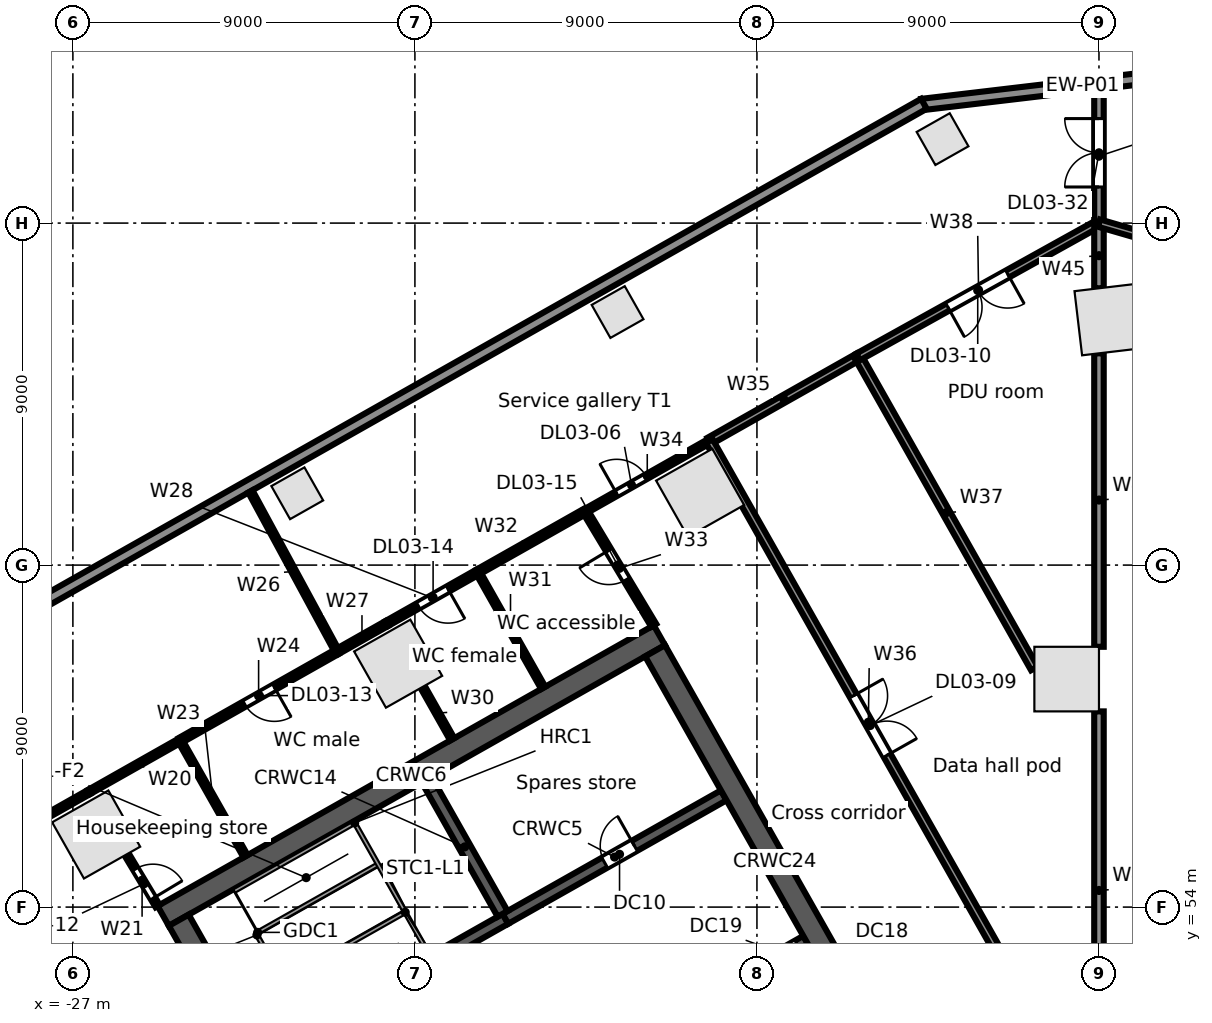
"""IFC4 building model, lengths in metres.
Left out: names, types, materials, properties, quantities, classifications, styles, units other than length and angle.
Written with IfcOpenShell. Run it as: python <this file> out.ifc"""

import sys

from ifc_helpers import new_model, si_unit, direction, frame, frame_2d, origin, origin_2d, place, context, subcontext, project, spatial, rectangle, extrude, element, fill, save


model = new_model("IFC4")
c1 = context("Model", 3, precision=1e-05, world=origin(), true_north=direction((0.0, 1.0)))
c2 = subcontext(c1, "Body", "Model", "MODEL_VIEW")
j1 = project(units=[si_unit("LENGTHUNIT", "METRE"), si_unit("PLANEANGLEUNIT", "RADIAN")], contexts=[c1])
p1 = place(None, origin())
s1 = spatial("IfcSite", under=j1, at=p1, CompositionType="ELEMENT")
p2 = place(p1, origin())
s2 = spatial("IfcBuilding", under=s1, at=p2, CompositionType="ELEMENT")
p3 = place(p2, frame((0.0, 0.0, 16.5)))
s3 = spatial("IfcBuildingStorey", under=s2, at=p3, CompositionType="ELEMENT", Elevation=16.5)
for number, where, z_axis, x_axis in (
    (1, (0.3, 69.464, 0.0), (0.0, 0.0, 1.0), (-0.993, -0.118, 0.0)),
    (2, (-10.495, 64.902, 0.0), (0.0, 0.0, 1.0), (-0.87, -0.492, 0.0)),
    (3, (-18.441, 60.406, 0.0), (0.0, 0.0, 1.0), (-0.87, -0.492, 0.0)),
    (4, (-26.388, 55.91, 0.0), (0.0, 0.0, 1.0), (-0.87, -0.492, 0.0)),
    (5, (-0.85, 60.0, 0.0), (0.0, 0.0, 1.0), (0.0, 1.0, 0.0)),
):
    element("IfcColumn", number, at=place(p3, frame(where, z_axis=z_axis, x_axis=x_axis)), inside=s3, PredefinedType="COLUMN", context=c2, shape_type="SweptSolid", body=[
        extrude(rectangle(XDim=1.7, YDim=1.7, at=origin_2d()), origin(), (0.0, 0.0, 1.0), 5.0),
    ])
for number, where, z_axis, x_axis in (
    (6, (-4.116, 74.21, 0.0), (0.0, 0.0, 1.0), (-0.87, -0.492, 0.0)),
    (7, (-12.667, 69.659, 0.0), (0.0, 0.0, 1.0), (-0.87, -0.492, 0.0)),
    (8, (-21.096, 64.89, 0.0), (0.0, 0.0, 1.0), (-0.87, -0.492, 0.0)),
):
    element("IfcColumn", number, at=place(p3, frame(where, z_axis=z_axis, x_axis=x_axis)), inside=s3, PredefinedType="COLUMN", context=c2, shape_type="SweptSolid", body=[
        extrude(rectangle(XDim=1.0, YDim=1.0, at=origin_2d()), origin(), (0.0, 0.0, 1.0), 5.0),
    ])
p4 = place(p3, frame((-4.663, 75.12, 0.0), z_axis=(0.0, 0.0, 1.0), x_axis=(0.993070050845, 0.117523929966, 0.0)))
e9 = element("IfcWall", 9, at=p4, inside=s3, PredefinedType="STANDARD", context=c2, shape_type="SweptSolid", body=[
    extrude(rectangle(XDim=8.528, YDim=0.3, at=frame_2d((4.264, 0.0))), origin(), (0.0, 0.0, 1.0), 4.65),
])
p5 = place(p3, frame((-63.707, 41.701, 0.0), z_axis=(0.0, 0.0, 1.0), x_axis=(0.870355510268, 0.492423888277, 0.0)))
e10 = element("IfcWall", 10, at=p5, inside=s3, PredefinedType="STANDARD", context=c2, shape_type="SweptSolid", body=[
    extrude(rectangle(XDim=67.903, YDim=0.3, at=frame_2d((33.952, 0.0))), origin(), (0.0, 0.0, 1.0), 4.65),
])
p6 = place(p3, frame((-13.365, 49.911, 0.0), z_axis=(0.0, 0.0, 1.0), x_axis=(0.870340995471, 0.49244954219, 0.0)))
e11 = element("IfcWall", 11, at=p6, inside=s3, PredefinedType="SOLIDWALL", context=c2, shape_type="SweptSolid", body=[
    extrude(rectangle(XDim=6.5, YDim=0.3, at=frame_2d((3.25, 0.0))), origin(), (0.0, 0.0, 1.0), 4.65),
])
p7 = place(p6, frame((1.95, 0.0, 0.0)))
e12 = element("IfcOpeningElement", 12, at=p7, cuts=e11, PredefinedType="OPENING", context=c2, shape_type="SweptSolid", body=[
    extrude(rectangle(XDim=0.9, YDim=2.1, at=frame_2d((0.45, 1.05))), frame((0.0, 0.16, 0.0), z_axis=(0.0, -1.0, 0.0), x_axis=(1.0, 0.0, 0.0)), (0.0, 0.0, 1.0), 0.32),
])
p8 = place(p6, frame((5.35, 0.0, 0.0)))
e13 = element("IfcOpeningElement", 13, at=p8, cuts=e11, PredefinedType="OPENING", context=c2, shape_type="SweptSolid", body=[
    extrude(rectangle(XDim=0.9, YDim=2.1, at=frame_2d((0.45, 1.05))), frame((0.0, 0.16, 0.0), z_axis=(0.0, -1.0, 0.0), x_axis=(1.0, 0.0, 0.0)), (0.0, 0.0, 1.0), 0.32),
])
p9 = place(p3, frame((-21.885, 50.146, 0.0), z_axis=(0.0, 0.0, 1.0), x_axis=(0.870359411463, 0.492416992881, 0.0)))
e14 = element("IfcWall", 14, at=p9, inside=s3, PredefinedType="SOLIDWALL", context=c2, shape_type="SweptSolid", body=[
    extrude(rectangle(XDim=7.2, YDim=0.3, at=frame_2d((3.6, 0.0))), origin(), (0.0, 0.0, 1.0), 4.65),
])
p10 = place(p9, frame((0.2, 0.0, 0.0)))
e15 = element("IfcOpeningElement", 15, at=p10, cuts=e14, PredefinedType="OPENING", context=c2, shape_type="SweptSolid", body=[
    extrude(rectangle(XDim=1.0, YDim=2.1, at=frame_2d((0.5, 1.05))), frame((0.0, 0.16, 0.0), z_axis=(0.0, -1.0, 0.0), x_axis=(1.0, 0.0, 0.0)), (0.0, 0.0, 1.0), 0.32),
])
p11 = place(p3, frame((-15.618, 53.691, 0.0), z_axis=(0.0, 0.0, 1.0), x_axis=(0.870356769198, 0.492421663121, 0.0)))
e16 = element("IfcWall", 16, at=p11, inside=s3, PredefinedType="SOLIDWALL", context=c2, shape_type="SweptSolid", body=[
    extrude(rectangle(XDim=6.6, YDim=0.3, at=frame_2d((3.3, 0.0))), origin(), (0.0, 0.0, 1.0), 4.65),
])
p12 = place(p11, frame((3.0, 0.0, 0.0)))
e17 = element("IfcOpeningElement", 17, at=p12, cuts=e16, PredefinedType="OPENING", context=c2, shape_type="SweptSolid", body=[
    extrude(rectangle(XDim=0.9, YDim=2.1, at=frame_2d((0.45, 1.05))), frame((0.0, 0.16, 0.0), z_axis=(0.0, -1.0, 0.0), x_axis=(1.0, 0.0, 0.0)), (0.0, 0.0, 1.0), 0.32),
])
p13 = place(p3, frame((-24.623, 53.767, 0.0), z_axis=(0.0, 0.0, 1.0), x_axis=(0.870356627484, 0.492421913601, 0.0)))
e18 = element("IfcWall", 18, at=p13, inside=s3, PredefinedType="SOLIDWALL", context=c2, shape_type="SweptSolid", body=[
    extrude(rectangle(XDim=15.0, YDim=0.6, at=frame_2d((7.5, 0.0))), origin(), (0.0, 0.0, 1.0), 4.65),
])
p14 = place(p3, frame((-24.214, 53.654, 0.0), z_axis=(0.0, 0.0, 1.0), x_axis=(0.492441221355, -0.870345703448, 0.0)))
e19 = element("IfcWall", 19, at=p14, inside=s3, PredefinedType="SOLIDWALL", context=c2, shape_type="SweptSolid", body=[
    extrude(rectangle(XDim=12.8, YDim=0.6, at=frame_2d((6.4, 0.0))), origin(), (0.0, 0.0, 1.0), 4.65),
])
p15 = place(p3, frame((-17.686, 57.347, 0.0), z_axis=(0.0, 0.0, 1.0), x_axis=(0.492420746998, -0.870357287513, 0.0)))
e20 = element("IfcWall", 20, at=p15, inside=s3, PredefinedType="SOLIDWALL", context=c2, shape_type="SweptSolid", body=[
    extrude(rectangle(XDim=4.05, YDim=0.3, at=frame_2d((2.025, 0.0))), origin(), (0.0, 0.0, 1.0), 4.65),
])
p16 = place(p3, frame((-11.681, 60.744, 0.0), z_axis=(0.0, 0.0, 1.0), x_axis=(0.492426772896, -0.870353878221, 0.0)))
e21 = element("IfcWall", 21, at=p16, inside=s3, PredefinedType="SOLIDWALL", context=c2, shape_type="SweptSolid", body=[
    extrude(rectangle(XDim=12.8, YDim=0.6, at=frame_2d((6.4, 0.0))), origin(), (0.0, 0.0, 1.0), 4.65),
])
p17 = place(p3, frame((-33.536, 53.09, 0.0), z_axis=(0.0, 0.0, 1.0), x_axis=(0.870327439455, 0.492473499928, 0.0)))
e22 = element("IfcWall", 22, at=p17, inside=s3, PredefinedType="PARTITIONING", context=c2, shape_type="SweptSolid", body=[
    extrude(rectangle(XDim=8.0, YDim=0.125, at=frame_2d((4.0, 0.0))), origin(), (0.0, 0.0, 1.0), 3.712),
])
p18 = place(p17, frame((3.45, 0.0, 0.0)))
e23 = element("IfcOpeningElement", 23, at=p18, cuts=e22, PredefinedType="OPENING", context=c2, shape_type="SweptSolid", body=[
    extrude(rectangle(XDim=0.9, YDim=2.1, at=frame_2d((0.45, 1.05))), frame((0.0, 0.073, 0.0), z_axis=(0.0, -1.0, 0.0), x_axis=(1.0, 0.0, 0.0)), (0.0, 0.0, 1.0), 0.145),
])
p19 = place(p3, frame((-26.573, 57.03, 0.0), z_axis=(0.0, 0.0, 1.0), x_axis=(0.870344460795, 0.492443417626, 0.0)))
e24 = element("IfcWall", 24, at=p19, inside=s3, PredefinedType="PARTITIONING", context=c2, shape_type="SweptSolid", body=[
    extrude(rectangle(XDim=2.75, YDim=0.125, at=frame_2d((1.375, 0.0))), origin(), (0.0, 0.0, 1.0), 4.65),
])
p20 = place(p3, frame((-25.587, 55.387, 0.0), z_axis=(0.0, 0.0, 1.0), x_axis=(0.514767546849, -0.857329792268, 0.0)))
e25 = element("IfcWall", 25, at=p20, inside=s3, PredefinedType="PARTITIONING", context=c2, shape_type="SweptSolid", body=[
    extrude(rectangle(XDim=1.585, YDim=0.125, at=frame_2d((0.792, 0.0))), origin(), (0.0, 0.0, 1.0), 4.65),
])
p21 = place(p20, frame((0.45, 0.0, 0.0)))
e26 = element("IfcOpeningElement", 26, at=p21, cuts=e25, PredefinedType="OPENING", context=c2, shape_type="SweptSolid", body=[
    extrude(rectangle(XDim=0.9, YDim=2.1, at=frame_2d((0.45, 1.05))), frame((0.0, 0.073, 0.0), z_axis=(0.0, -1.0, 0.0), x_axis=(1.0, 0.0, 0.0)), (0.0, 0.0, 1.0), 0.145),
])
p22 = place(p3, frame((-24.18, 58.384, 0.0), z_axis=(0.0, 0.0, 1.0), x_axis=(0.492521469645, -0.870300294116, 0.0)))
e27 = element("IfcWall", 27, at=p22, inside=s3, PredefinedType="PARTITIONING", context=c2, shape_type="SweptSolid", body=[
    extrude(rectangle(XDim=3.5, YDim=0.125, at=frame_2d((1.75, 0.0))), origin(), (0.0, 0.0, 1.0), 3.93),
])
p23 = place(p3, frame((-24.18, 58.384, 0.0), z_axis=(0.0, 0.0, 1.0), x_axis=(0.870360772617, 0.492414587, 0.0)))
e28 = element("IfcWall", 28, at=p23, inside=s3, PredefinedType="PARTITIONING", context=c2, shape_type="SweptSolid", body=[
    extrude(rectangle(XDim=4.75, YDim=0.15, at=frame_2d((2.375, 0.0))), origin(), (0.0, 0.0, 1.0), 4.65),
])
p24 = place(p23, frame((1.95, 0.0, 0.0)))
e29 = element("IfcOpeningElement", 29, at=p24, cuts=e28, PredefinedType="OPENING", context=c2, shape_type="SweptSolid", body=[
    extrude(rectangle(XDim=0.9, YDim=2.1, at=frame_2d((0.45, 1.05))), frame((0.0, 0.085, 0.0), z_axis=(0.0, -1.0, 0.0), x_axis=(1.0, 0.0, 0.0)), (0.0, 0.0, 1.0), 0.17),
])
p25 = place(p3, frame((-22.33, 64.939, 0.0), z_axis=(0.0, 0.0, 1.0), x_axis=(0.476360236723, -0.879250206067, 0.0)))
e30 = element("IfcWall", 30, at=p25, inside=s3, PredefinedType="PARTITIONING", context=c2, shape_type="SweptSolid", body=[
    extrude(rectangle(XDim=4.795, YDim=0.125, at=frame_2d((2.397, 0.0))), origin(), (0.0, 0.0, 1.0), 3.93),
])
p26 = place(p3, frame((-20.046, 60.723, 0.0), z_axis=(0.0, 0.0, 1.0), x_axis=(0.870308175411, 0.492507542899, 0.0)))
e31 = element("IfcWall", 31, at=p26, inside=s3, PredefinedType="PARTITIONING", context=c2, shape_type="SweptSolid", body=[
    extrude(rectangle(XDim=1.5, YDim=0.15, at=frame_2d((0.75, 0.0))), origin(), (0.0, 0.0, 1.0), 3.93),
])
p27 = place(p3, frame((-18.74, 61.462, 0.0), z_axis=(0.0, 0.0, 1.0), x_axis=(0.870430549821, 0.492291232848, 0.0)))
e32 = element("IfcWall", 32, at=p27, inside=s3, PredefinedType="PARTITIONING", context=c2, shape_type="SweptSolid", body=[
    extrude(rectangle(XDim=2.75, YDim=0.15, at=frame_2d((1.375, 0.0))), origin(), (0.0, 0.0, 1.0), 4.65),
])
p28 = place(p27, frame((0.95, 0.0, 0.0)))
e33 = element("IfcOpeningElement", 33, at=p28, cuts=e32, PredefinedType="OPENING", context=c2, shape_type="SweptSolid", body=[
    extrude(rectangle(XDim=0.9, YDim=2.1, at=frame_2d((0.45, 1.05))), frame((0.0, 0.085, 0.0), z_axis=(0.0, -1.0, 0.0), x_axis=(1.0, 0.0, 0.0)), (0.0, 0.0, 1.0), 0.17),
])
p29 = place(p3, frame((-17.797, 59.794, 0.0), z_axis=(0.0, 0.0, 1.0), x_axis=(0.492366981934, -0.870387703901, 0.0)))
e34 = element("IfcWall", 34, at=p29, inside=s3, PredefinedType="PARTITIONING", context=c2, shape_type="SweptSolid", body=[
    extrude(rectangle(XDim=1.584, YDim=0.125, at=frame_2d((0.792, 0.0))), origin(), (0.0, 0.0, 1.0), 4.65),
])
p30 = place(p3, frame((-16.346, 62.816, 0.0), z_axis=(0.0, 0.0, 1.0), x_axis=(0.492220429283, -0.870470590541, 0.0)))
e35 = element("IfcWall", 35, at=p30, inside=s3, PredefinedType="PARTITIONING", context=c2, shape_type="SweptSolid", body=[
    extrude(rectangle(XDim=3.5, YDim=0.125, at=frame_2d((1.75, 0.0))), origin(), (0.0, 0.0, 1.0), 3.93),
])
p31 = place(p3, frame((-16.346, 62.816, 0.0), z_axis=(0.0, 0.0, 1.0), x_axis=(0.870334637055, 0.492460779699, 0.0)))
e36 = element("IfcWall", 36, at=p31, inside=s3, PredefinedType="PARTITIONING", context=c2, shape_type="SweptSolid", body=[
    extrude(rectangle(XDim=3.249, YDim=0.15, at=frame_2d((1.625, 0.0))), origin(), (0.0, 0.0, 1.0), 4.65),
])
p32 = place(p3, frame((-13.518, 64.416, 0.0), z_axis=(0.0, 0.0, 1.0), x_axis=(0.514875058642, -0.857265229663, 0.0)))
e37 = element("IfcWall", 37, at=p32, inside=s3, PredefinedType="PARTITIONING", context=c2, shape_type="SweptSolid", body=[
    extrude(rectangle(XDim=3.502, YDim=0.15, at=frame_2d((1.751, 0.0))), origin(), (0.0, 0.0, 1.0), 3.93),
])
p33 = place(p32, frame((1.2, 0.0, 0.0)))
e38 = element("IfcOpeningElement", 38, at=p33, cuts=e37, PredefinedType="OPENING", context=c2, shape_type="SweptSolid", body=[
    extrude(rectangle(XDim=0.9, YDim=2.1, at=frame_2d((0.45, 1.05))), frame((0.0, 0.085, 0.0), z_axis=(0.0, -1.0, 0.0), x_axis=(1.0, 0.0, 0.0)), (0.0, 0.0, 1.0), 0.17),
])
p34 = place(p3, frame((-13.518, 64.416, 0.0), z_axis=(0.0, 0.0, 1.0), x_axis=(0.870338454914, 0.492454032268, 0.0)))
e39 = element("IfcWall", 39, at=p34, inside=s3, PredefinedType="PARTITIONING", context=c2, shape_type="SweptSolid", body=[
    extrude(rectangle(XDim=3.75, YDim=0.125, at=frame_2d((1.875, 0.0))), origin(), (0.0, 0.0, 1.0), 3.712),
])
p35 = place(p34, frame((0.95, 0.0, 0.0)))
e40 = element("IfcOpeningElement", 40, at=p35, cuts=e39, PredefinedType="OPENING", context=c2, shape_type="SweptSolid", body=[
    extrude(rectangle(XDim=0.9, YDim=2.1, at=frame_2d((0.45, 1.05))), frame((0.0, 0.073, 0.0), z_axis=(0.0, -1.0, 0.0), x_axis=(1.0, 0.0, 0.0)), (0.0, 0.0, 1.0), 0.145),
])
p36 = place(p3, frame((-10.254, 66.263, 0.0), z_axis=(0.0, 0.0, 1.0), x_axis=(0.870454697906, 0.492248533664, 0.0)))
e41 = element("IfcWall", 41, at=p36, inside=s3, PredefinedType="PARTITIONING", context=c2, shape_type="SweptSolid", body=[
    extrude(rectangle(XDim=4.5, YDim=0.2, at=frame_2d((2.25, 0.0))), origin(), (0.0, 0.0, 1.0), 4.65),
])
p37 = place(p3, frame((-10.254, 66.263, 0.0), z_axis=(0.0, 0.0, 1.0), x_axis=(0.492411664329, -0.870362426138, 0.0)))
e42 = element("IfcWall", 42, at=p37, inside=s3, PredefinedType="PARTITIONING", context=c2, shape_type="SweptSolid", body=[
    extrude(rectangle(XDim=17.0, YDim=0.2, at=frame_2d((8.5, 0.0))), origin(), (0.0, 0.0, 1.0), 3.712),
])
p38 = place(p37, frame((7.7, 0.0, 0.0)))
e43 = element("IfcOpeningElement", 43, at=p38, cuts=e42, PredefinedType="OPENING", context=c2, shape_type="SweptSolid", body=[
    extrude(rectangle(XDim=1.8, YDim=2.1, at=frame_2d((0.9, 1.05))), frame((0.0, 0.11, 0.0), z_axis=(0.0, -1.0, 0.0), x_axis=(1.0, 0.0, 0.0)), (0.0, 0.0, 1.0), 0.22),
])
p39 = place(p3, frame((-6.337, 68.478, 0.0), z_axis=(0.0, 0.0, 1.0), x_axis=(0.492412602502, -0.870361895361, 0.0)))
e44 = element("IfcWall", 44, at=p39, inside=s3, PredefinedType="PARTITIONING", context=c2, shape_type="SweptSolid", body=[
    extrude(rectangle(XDim=9.417, YDim=0.2, at=frame_2d((4.708, 0.0))), origin(), (0.0, 0.0, 1.0), 3.712),
])
p40 = place(p3, frame((-6.337, 68.478, 0.0), z_axis=(0.0, 0.0, 1.0), x_axis=(0.87407148623, 0.485797320864, 0.0)))
e45 = element("IfcWall", 45, at=p40, inside=s3, PredefinedType="PARTITIONING", context=c2, shape_type="SweptSolid", body=[
    extrude(rectangle(XDim=7.25, YDim=0.2, at=frame_2d((3.625, 0.0))), origin(), (0.0, 0.0, 1.0), 3.93),
])
p41 = place(p40, frame((2.7, 0.0, 0.0)))
e46 = element("IfcOpeningElement", 46, at=p41, cuts=e45, PredefinedType="OPENING", context=c2, shape_type="SweptSolid", body=[
    extrude(rectangle(XDim=1.8, YDim=2.1, at=frame_2d((0.9, 1.05))), frame((0.0, 0.11, 0.0), z_axis=(0.0, -1.0, 0.0), x_axis=(1.0, 0.0, 0.0)), (0.0, 0.0, 1.0), 0.22),
])
p42 = place(p3, frame((0.0, 49.726, 0.0), z_axis=(0.0, 0.0, 1.0), x_axis=(0.0, 1.0, 0.0)))
e47 = element("IfcWall", 47, at=p42, inside=s3, PredefinedType="PARTITIONING", context=c2, shape_type="SweptSolid", body=[
    extrude(rectangle(XDim=9.424, YDim=0.25, at=frame_2d((4.712, 0.0))), origin(), (0.0, 0.0, 1.0), 4.65),
])
p43 = place(p3, frame((0.0, 60.85, 0.0), z_axis=(0.0, 0.0, 1.0), x_axis=(0.0, 1.0, 0.0)))
e48 = element("IfcWall", 48, at=p43, inside=s3, PredefinedType="PARTITIONING", context=c2, shape_type="SweptSolid", body=[
    extrude(rectangle(XDim=7.723, YDim=0.25, at=frame_2d((3.861, 0.0))), origin(), (0.0, 0.0, 1.0), 3.93),
])
p44 = place(p3, frame((0.0, 70.285, 0.0), z_axis=(0.0, 0.0, 1.0), x_axis=(0.0, 1.0, 0.0)))
e49 = element("IfcWall", 49, at=p44, inside=s3, PredefinedType="PARTITIONING", context=c2, shape_type="SweptSolid", body=[
    extrude(rectangle(XDim=1.715, YDim=0.25, at=frame_2d((0.857, 0.0))), origin(), (0.0, 0.0, 1.0), 4.65),
])
p45 = place(p3, frame((0.0, 72.0, 0.0), z_axis=(0.0, 0.0, 1.0), x_axis=(0.0, 1.0, 0.0)))
e50 = element("IfcWall", 50, at=p45, inside=s3, PredefinedType="PARTITIONING", context=c2, shape_type="SweptSolid", body=[
    extrude(rectangle(XDim=3.521, YDim=0.25, at=frame_2d((1.76, 0.0))), origin(), (0.0, 0.0, 1.0), 4.024),
])
p46 = place(p45, frame((0.95, 0.0, 0.0)))
e51 = element("IfcOpeningElement", 51, at=p46, cuts=e50, PredefinedType="OPENING", context=c2, shape_type="SweptSolid", body=[
    extrude(rectangle(XDim=1.8, YDim=2.1, at=frame_2d((0.9, 1.05))), frame((0.0, 0.135, 0.0), z_axis=(0.0, -1.0, 0.0), x_axis=(1.0, 0.0, 0.0)), (0.0, 0.0, 1.0), 0.27),
])
p47 = place(p3, frame((0.0, 72.0, 0.0), z_axis=(0.0, 0.0, 1.0), x_axis=(0.960375968852, -0.278707729443, 0.0)))
e52 = element("IfcWall", 52, at=p47, inside=s3, PredefinedType="PARTITIONING", context=c2, shape_type="SweptSolid", body=[
    extrude(rectangle(XDim=11.058, YDim=0.2, at=frame_2d((5.529, 0.0))), origin(), (0.0, 0.0, 1.0), 3.712),
])
p48 = place(p47, frame((4.7, 0.0, 0.0)))
e53 = element("IfcOpeningElement", 53, at=p48, cuts=e52, PredefinedType="OPENING", context=c2, shape_type="SweptSolid", body=[
    extrude(rectangle(XDim=1.8, YDim=2.1, at=frame_2d((0.9, 1.05))), frame((0.0, 0.11, 0.0), z_axis=(0.0, -1.0, 0.0), x_axis=(1.0, 0.0, 0.0)), (0.0, 0.0, 1.0), 0.22),
])
p49 = place(p12, origin())
e54 = element("IfcDoor", 54, at=p49, inside=s3, OperationType="SINGLE_SWING_RIGHT", PredefinedType="DOOR", context=c2, shape_type="SweptSolid", body=[
    extrude(rectangle(XDim=0.9, YDim=2.1, at=frame_2d((0.45, 1.05))), frame((0.0, 0.025, 0.0), z_axis=(0.0, -1.0, 0.0), x_axis=(1.0, 0.0, 0.0)), (0.0, 0.0, 1.0), 0.05),
])
fill(e17, e54)
p50 = place(p35, origin())
e55 = element("IfcDoor", 55, at=p50, inside=s3, OperationType="SINGLE_SWING_LEFT", PredefinedType="DOOR", context=c2, shape_type="SweptSolid", body=[
    extrude(rectangle(XDim=0.9, YDim=2.1, at=frame_2d((0.45, 1.05))), frame((0.0, 0.025, 0.0), z_axis=(0.0, -1.0, 0.0), x_axis=(1.0, 0.0, 0.0)), (0.0, 0.0, 1.0), 0.05),
])
fill(e40, e55)
p51 = place(p38, origin())
e56 = element("IfcDoor", 56, at=p51, inside=s3, OperationType="DOUBLE_DOOR_SINGLE_SWING", PredefinedType="DOOR", context=c2, shape_type="SweptSolid", body=[
    extrude(rectangle(XDim=1.8, YDim=2.1, at=frame_2d((0.9, 1.05))), frame((0.0, 0.025, 0.0), z_axis=(0.0, -1.0, 0.0), x_axis=(1.0, 0.0, 0.0)), (0.0, 0.0, 1.0), 0.05),
])
fill(e43, e56)
p52 = place(p41, frame((1.8, 0.0, 0.0), z_axis=(0.0, 0.0, 1.0), x_axis=(-1.0, 0.0, 0.0)))
e57 = element("IfcDoor", 57, at=p52, inside=s3, OperationType="DOUBLE_DOOR_SINGLE_SWING", PredefinedType="DOOR", context=c2, shape_type="SweptSolid", body=[
    extrude(rectangle(XDim=1.8, YDim=2.1, at=frame_2d((0.9, 1.05))), frame((0.0, 0.025, 0.0), z_axis=(0.0, -1.0, 0.0), x_axis=(1.0, 0.0, 0.0)), (0.0, 0.0, 1.0), 0.05),
])
fill(e46, e57)
p53 = place(p21, origin())
e58 = element("IfcDoor", 58, at=p53, inside=s3, OperationType="SINGLE_SWING_RIGHT", PredefinedType="DOOR", context=c2, shape_type="SweptSolid", body=[
    extrude(rectangle(XDim=0.9, YDim=2.1, at=frame_2d((0.45, 1.05))), frame((0.0, 0.025, 0.0), z_axis=(0.0, -1.0, 0.0), x_axis=(1.0, 0.0, 0.0)), (0.0, 0.0, 1.0), 0.05),
])
fill(e26, e58)
p54 = place(p24, frame((0.9, 0.0, 0.0), z_axis=(0.0, 0.0, 1.0), x_axis=(-1.0, 0.0, 0.0)))
e59 = element("IfcDoor", 59, at=p54, inside=s3, OperationType="SINGLE_SWING_LEFT", PredefinedType="DOOR", context=c2, shape_type="SweptSolid", body=[
    extrude(rectangle(XDim=0.9, YDim=2.1, at=frame_2d((0.45, 1.05))), frame((0.0, 0.025, 0.0), z_axis=(0.0, -1.0, 0.0), x_axis=(1.0, 0.0, 0.0)), (0.0, 0.0, 1.0), 0.05),
])
fill(e29, e59)
p55 = place(p28, frame((0.9, 0.0, 0.0), z_axis=(0.0, 0.0, 1.0), x_axis=(-1.0, 0.0, 0.0)))
e60 = element("IfcDoor", 60, at=p55, inside=s3, OperationType="SINGLE_SWING_LEFT", PredefinedType="DOOR", context=c2, shape_type="SweptSolid", body=[
    extrude(rectangle(XDim=0.9, YDim=2.1, at=frame_2d((0.45, 1.05))), frame((0.0, 0.025, 0.0), z_axis=(0.0, -1.0, 0.0), x_axis=(1.0, 0.0, 0.0)), (0.0, 0.0, 1.0), 0.05),
])
fill(e33, e60)
p56 = place(p33, frame((0.9, 0.0, 0.0), z_axis=(0.0, 0.0, 1.0), x_axis=(-1.0, 0.0, 0.0)))
e61 = element("IfcDoor", 61, at=p56, inside=s3, OperationType="SINGLE_SWING_RIGHT", PredefinedType="DOOR", context=c2, shape_type="SweptSolid", body=[
    extrude(rectangle(XDim=0.9, YDim=2.1, at=frame_2d((0.45, 1.05))), frame((0.0, 0.025, 0.0), z_axis=(0.0, -1.0, 0.0), x_axis=(1.0, 0.0, 0.0)), (0.0, 0.0, 1.0), 0.05),
])
fill(e38, e61)
p57 = place(p46, origin())
e62 = element("IfcDoor", 62, at=p57, inside=s3, OperationType="DOUBLE_DOOR_SINGLE_SWING", PredefinedType="DOOR", context=c2, shape_type="SweptSolid", body=[
    extrude(rectangle(XDim=1.8, YDim=2.1, at=frame_2d((0.9, 1.05))), frame((0.0, 0.025, 0.0), z_axis=(0.0, -1.0, 0.0), x_axis=(1.0, 0.0, 0.0)), (0.0, 0.0, 1.0), 0.05),
])
fill(e51, e62)
save(model, sys.argv[1])
